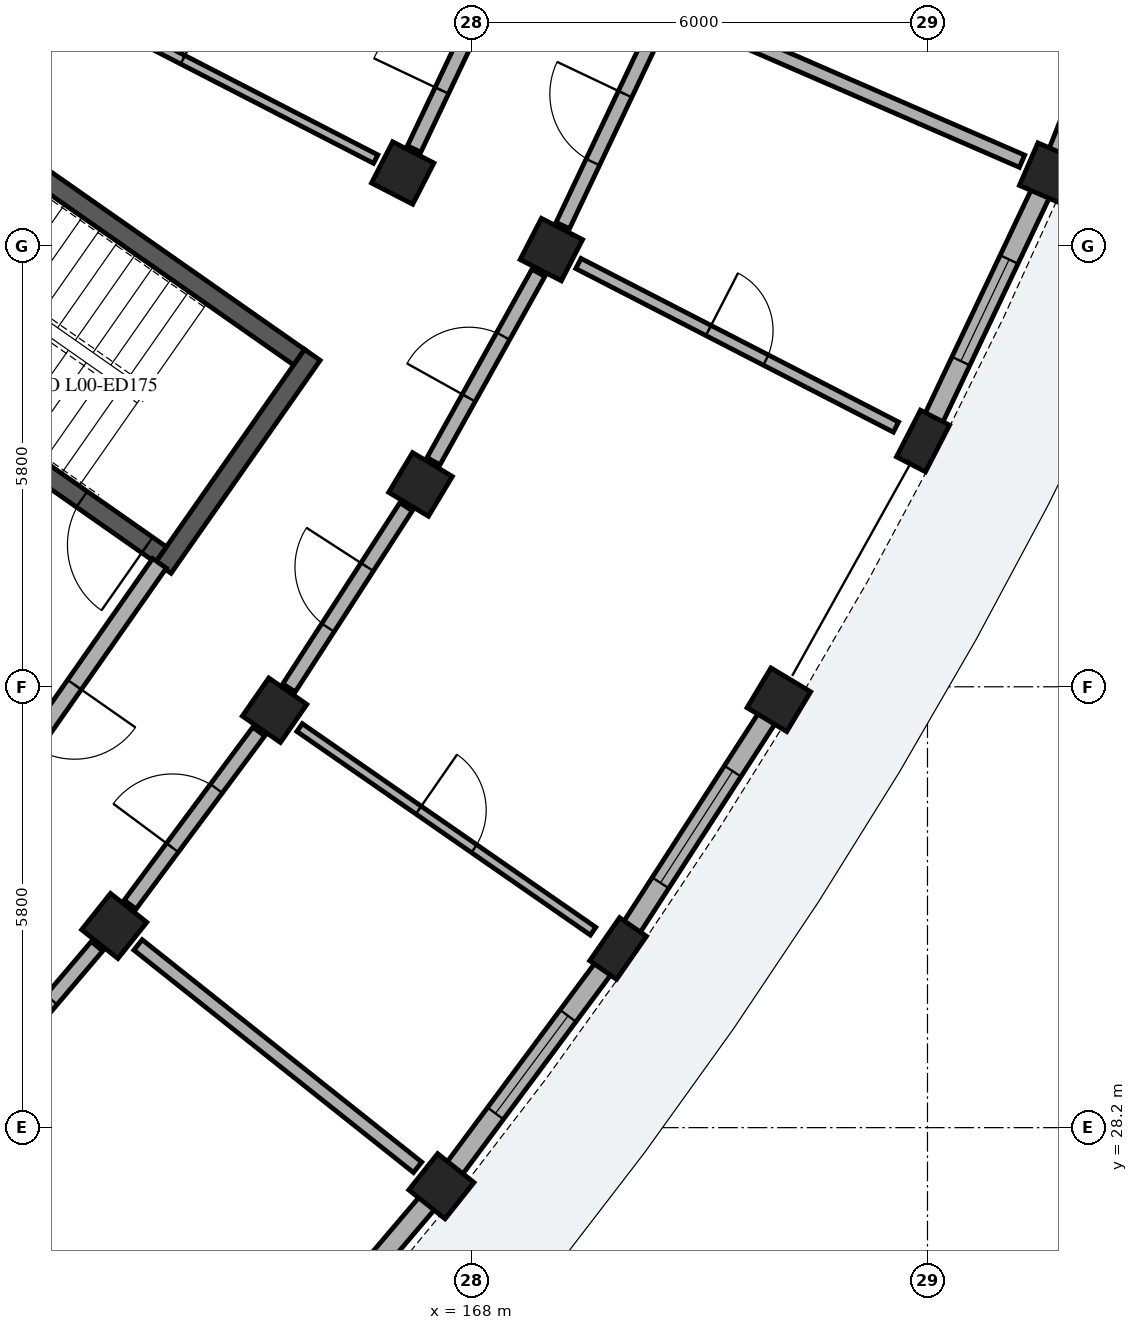
"""IFC4 building model, lengths in metres.
Left out: names, types, materials, properties, quantities, classifications, styles, units other than length and angle.
Written with IfcOpenShell. Run it as: python <this file> out.ifc"""

import sys

from ifc_helpers import new_model, si_unit, direction, frame, frame_2d, origin, origin_2d, place, context, subcontext, project, spatial, rectangle, extrude, element, fill, save


model = new_model("IFC4")
c1 = context("Model", 3, precision=1e-05, world=origin(), true_north=direction((0.0, 1.0)))
c2 = subcontext(c1, "Body", "Model", "MODEL_VIEW")
j1 = project(units=[si_unit("LENGTHUNIT", "METRE"), si_unit("PLANEANGLEUNIT", "RADIAN")], contexts=[c1])
p1 = place(None, origin())
s1 = spatial("IfcSite", under=j1, at=p1, CompositionType="ELEMENT")
p2 = place(p1, origin())
s2 = spatial("IfcBuilding", under=s1, at=p2, CompositionType="ELEMENT")
p3 = place(p2, origin())
s3 = spatial("IfcBuildingStorey", under=s2, at=p3, CompositionType="ELEMENT", Elevation=0.0)
p4 = place(p3, frame((165.733, 38.336, 0.0), z_axis=(0.0, 0.0, 1.0), x_axis=(-0.819153711596, 0.573574055182, 0.0)))
e1 = element("IfcWall", 1, at=p4, inside=s3, PredefinedType="SHEAR", context=c2, shape_type="SweptSolid", body=[
    extrude(rectangle(XDim=6.6, YDim=0.25, at=frame_2d((3.3, 0.0))), origin(), (0.0, 0.0, 1.0), 4.48),
])
p5 = place(p3, frame((165.907, 38.366, 0.0), z_axis=(0.0, 0.0, 1.0), x_axis=(-0.573582112484, -0.819148069789, 0.0)))
e2 = element("IfcWall", 2, at=p5, inside=s3, PredefinedType="SHEAR", context=c2, shape_type="SweptSolid", body=[
    extrude(rectangle(XDim=3.42, YDim=0.25, at=frame_2d((1.71, 0.0))), origin(), (0.0, 0.0, 1.0), 4.48),
])
p6 = place(p3, frame((163.914, 35.739, 0.0), z_axis=(0.0, 0.0, 1.0), x_axis=(-0.819153711596, 0.573574055182, 0.0)))
e3 = element("IfcWall", 3, at=p6, inside=s3, PredefinedType="SHEAR", context=c2, shape_type="SweptSolid", body=[
    extrude(rectangle(XDim=6.6, YDim=0.25, at=frame_2d((3.3, 0.0))), origin(), (0.0, 0.0, 1.0), 4.48),
])
p7 = place(p6, frame((0.22, 0.0, 0.0)))
e4 = element("IfcOpeningElement", 4, at=p7, cuts=e3, PredefinedType="OPENING", context=c2, shape_type="SweptSolid", body=[
    extrude(rectangle(XDim=1.05, YDim=2.15, at=frame_2d((0.525, 1.075))), frame((0.0, 0.135, 0.0), z_axis=(0.0, -1.0, 0.0), x_axis=(1.0, 0.0, 0.0)), (0.0, 0.0, 1.0), 0.27),
])
for number, where, z_axis, x_axis in (
    (5, (163.3, 30.853, 0.0), (0.0, 0.0, 1.0), (0.783, -0.623, 0.0)),
    (6, (167.604, 27.429, 0.0), (0.0, 0.0, 1.0), (0.783, -0.623, 0.0)),
    (7, (165.41, 33.692, 0.0), (0.0, 0.0, 1.0), (0.822, -0.57, 0.0)),
):
    element("IfcColumn", number, at=place(p3, frame(where, z_axis=z_axis, x_axis=x_axis)), inside=s3, PredefinedType="COLUMN", context=c2, shape_type="SweptSolid", body=[
        extrude(rectangle(XDim=0.61, YDim=0.61, at=origin_2d()), origin(), (0.0, 0.0, 1.0), 4.485),
    ])
p8 = place(p3, frame((169.929, 30.557, 0.0), z_axis=(0.0, 0.0, 1.0), x_axis=(0.821646937942, -0.569996762596, 0.0)))
e8 = element("IfcColumn", 8, at=p8, inside=s3, PredefinedType="PILASTER", context=c2, shape_type="SweptSolid", body=[
    extrude(rectangle(XDim=0.43, YDim=0.69, at=origin_2d()), origin(), (0.0, 0.0, 1.0), 4.485),
])
for number, where, z_axis, x_axis in (
    (9, (167.33, 36.662, 0.0), (0.0, 0.0, 1.0), (0.857, -0.515, 0.0)),
    (10, (172.044, 33.83, 0.0), (0.0, 0.0, 1.0), (0.857, -0.515, 0.0)),
    (11, (167.095, 40.759, 0.0), (0.0, 0.0, 1.0), (0.889, -0.458, 0.0)),
    (12, (169.051, 39.752, 0.0), (0.0, 0.0, 1.0), (0.889, -0.458, 0.0)),
):
    element("IfcColumn", number, at=place(p3, frame(where, z_axis=z_axis, x_axis=x_axis)), inside=s3, PredefinedType="COLUMN", context=c2, shape_type="SweptSolid", body=[
        extrude(rectangle(XDim=0.61, YDim=0.61, at=origin_2d()), origin(), (0.0, 0.0, 1.0), 4.485),
    ])
p9 = place(p3, frame((173.941, 37.234, 0.0), z_axis=(0.0, 0.0, 1.0), x_axis=(0.889017141486, -0.457873915117, 0.0)))
e13 = element("IfcColumn", 13, at=p9, inside=s3, PredefinedType="PILASTER", context=c2, shape_type="SweptSolid", body=[
    extrude(rectangle(XDim=0.43, YDim=0.69, at=origin_2d()), origin(), (0.0, 0.0, 1.0), 4.485),
])
p10 = place(p3, frame((175.611, 40.754, 0.0), z_axis=(0.0, 0.0, 1.0), x_axis=(0.917060074385, -0.398749068925, 0.0)))
e14 = element("IfcColumn", 14, at=p10, inside=s3, PredefinedType="COLUMN", context=c2, shape_type="SweptSolid", body=[
    extrude(rectangle(XDim=0.61, YDim=0.61, at=origin_2d()), origin(), (0.0, 0.0, 1.0), 4.485),
])
p11 = place(p3, frame((165.2, 24.602, 0.0), z_axis=(0.0, 0.0, 1.0), x_axis=(0.6477968765, 0.7618131049, 0.0)))
e15 = element("IfcWall", 15, at=p11, inside=s3, PredefinedType="SOLIDWALL", context=c2, shape_type="SweptSolid", body=[
    extrude(rectangle(XDim=3.437, YDim=0.26, at=frame_2d((1.718, 0.0))), origin(), (0.0, 0.0, 1.0), 3.755),
])
p12 = place(p11, frame((0.993, 0.0, 0.55)))
e16 = element("IfcOpeningElement", 16, at=p12, cuts=e15, PredefinedType="OPENING", context=c2, shape_type="SweptSolid", body=[
    extrude(rectangle(XDim=1.45, YDim=1.7, at=frame_2d((0.725, 0.85))), frame((0.0, 0.14, 0.0), z_axis=(0.0, -1.0, 0.0), x_axis=(1.0, 0.0, 0.0)), (0.0, 0.0, 1.0), 0.28),
])
p13 = place(p3, frame((167.768, 27.65, 0.0), z_axis=(0.0, 0.0, 1.0), x_axis=(0.596562008048, 0.802566988203, 0.0)))
e17 = element("IfcWall", 17, at=p13, inside=s3, PredefinedType="SOLIDWALL", context=c2, shape_type="SweptSolid", body=[
    extrude(rectangle(XDim=3.437, YDim=0.26, at=frame_2d((1.718, 0.0))), origin(), (0.0, 0.0, 1.0), 3.755),
])
p14 = place(p13, frame((0.918, 0.0, 0.55)))
e18 = element("IfcOpeningElement", 18, at=p14, cuts=e17, PredefinedType="OPENING", context=c2, shape_type="SweptSolid", body=[
    extrude(rectangle(XDim=1.6, YDim=1.75, at=frame_2d((0.8, 0.875))), frame((0.0, 0.14, 0.0), z_axis=(0.0, -1.0, 0.0), x_axis=(1.0, 0.0, 0.0)), (0.0, 0.0, 1.0), 0.28),
])
p15 = place(p3, frame((170.03, 30.712, 0.0), z_axis=(0.0, 0.0, 1.0), x_axis=(0.54279171039, 0.839867346152, 0.0)))
e19 = element("IfcWall", 19, at=p15, inside=s3, PredefinedType="SOLIDWALL", context=c2, shape_type="SweptSolid", body=[
    extrude(rectangle(XDim=3.437, YDim=0.26, at=frame_2d((1.718, 0.0))), origin(), (0.0, 0.0, 1.0), 3.755),
])
p16 = place(p15, frame((0.844, 0.0, 0.55)))
e20 = element("IfcOpeningElement", 20, at=p16, cuts=e19, PredefinedType="OPENING", context=c2, shape_type="SweptSolid", body=[
    extrude(rectangle(XDim=1.75, YDim=1.85, at=frame_2d((0.875, 0.925))), frame((0.0, 0.14, 0.0), z_axis=(0.0, -1.0, 0.0), x_axis=(1.0, 0.0, 0.0)), (0.0, 0.0, 1.0), 0.28),
])
p17 = place(p3, frame((174.02, 37.401, 0.0), z_axis=(0.0, 0.0, 1.0), x_axis=(0.428562647062, 0.903512068289, 0.0)))
e21 = element("IfcWall", 21, at=p17, inside=s3, PredefinedType="SOLIDWALL", context=c2, shape_type="SweptSolid", body=[
    extrude(rectangle(XDim=3.437, YDim=0.26, at=frame_2d((1.718, 0.0))), origin(), (0.0, 0.0, 1.0), 3.755),
])
p18 = place(p17, frame((0.979, 0.0, 0.55)))
e22 = element("IfcOpeningElement", 22, at=p18, cuts=e21, PredefinedType="OPENING", context=c2, shape_type="SweptSolid", body=[
    extrude(rectangle(XDim=1.48, YDim=1.62, at=frame_2d((0.74, 0.81))), frame((0.0, 0.14, 0.0), z_axis=(0.0, -1.0, 0.0), x_axis=(1.0, 0.0, 0.0)), (0.0, 0.0, 1.0), 0.28),
])
p19 = place(p3, frame((175.712, 41.01, 0.0), z_axis=(0.0, 0.0, 1.0), x_axis=(0.368547399693, 0.929608957669, 0.0)))
e23 = element("IfcWall", 23, at=p19, inside=s3, PredefinedType="SOLIDWALL", context=c2, shape_type="SweptSolid", body=[
    extrude(rectangle(XDim=3.437, YDim=0.26, at=frame_2d((1.718, 0.0))), origin(), (0.0, 0.0, 1.0), 3.755),
])
p20 = place(p19, frame((1.118, 0.0, 0.55)))
e24 = element("IfcOpeningElement", 24, at=p20, cuts=e23, PredefinedType="OPENING", context=c2, shape_type="SweptSolid", body=[
    extrude(rectangle(XDim=1.2, YDim=1.51, at=frame_2d((0.6, 0.755))), frame((0.0, 0.14, 0.0), z_axis=(0.0, -1.0, 0.0), x_axis=(1.0, 0.0, 0.0)), (0.0, 0.0, 1.0), 0.28),
])
p21 = place(p3, frame((163.895, 35.624, 0.0), z_axis=(0.0, 0.0, 1.0), x_axis=(-0.573572687386, -0.819154669329, 0.0)))
e25 = element("IfcWall", 25, at=p21, inside=s3, PredefinedType="PARTITIONING", context=c2, shape_type="SweptSolid", body=[
    extrude(rectangle(XDim=4.9, YDim=0.22, at=frame_2d((2.45, 0.0))), origin(), (0.0, 0.0, 1.0), 3.74),
])
p22 = place(p21, frame((1.95, 0.0, 0.0)))
e26 = element("IfcOpeningElement", 26, at=p22, cuts=e25, PredefinedType="OPENING", context=c2, shape_type="SweptSolid", body=[
    extrude(rectangle(XDim=0.98, YDim=2.14, at=frame_2d((0.49, 1.07))), frame((0.0, 0.12, 0.0), z_axis=(0.0, -1.0, 0.0), x_axis=(1.0, 0.0, 0.0)), (0.0, 0.0, 1.0), 0.24),
])
p23 = place(p3, frame((161.236, 28.425, 0.0), z_axis=(0.0, 0.0, 1.0), x_axis=(0.64778830669, 0.761820392032, 0.0)))
e27 = element("IfcWall", 27, at=p23, inside=s3, PredefinedType="PARTITIONING", context=c2, shape_type="SweptSolid", body=[
    extrude(rectangle(XDim=2.837, YDim=0.195, at=frame_2d((1.418, 0.0))), origin(), (0.0, 0.0, 1.0), 3.1),
])
p24 = place(p23, frame((0.924, 0.0, 0.0)))
e28 = element("IfcOpeningElement", 28, at=p24, cuts=e27, PredefinedType="OPENING", context=c2, shape_type="SweptSolid", body=[
    extrude(rectangle(XDim=0.99, YDim=2.16, at=frame_2d((0.495, 1.08))), frame((0.0, 0.107, 0.0), z_axis=(0.0, -1.0, 0.0), x_axis=(1.0, 0.0, 0.0)), (0.0, 0.0, 1.0), 0.215),
])
p25 = place(p3, frame((163.613, 30.604, 0.0), z_axis=(0.0, 0.0, 1.0), x_axis=(0.782609106384, -0.622513442911, 0.0)))
e29 = element("IfcWall", 29, at=p25, inside=s3, PredefinedType="PARTITIONING", context=c2, shape_type="SweptSolid", body=[
    extrude(rectangle(XDim=4.7, YDim=0.175, at=frame_2d((2.35, 0.0))), origin(), (0.0, 0.0, 1.0), 3.1),
])
p26 = place(p3, frame((163.509, 31.134, 0.0), z_axis=(0.0, 0.0, 1.0), x_axis=(0.596552136601, 0.802574325727, 0.0)))
e30 = element("IfcWall", 30, at=p26, inside=s3, PredefinedType="PARTITIONING", context=c2, shape_type="SweptSolid", body=[
    extrude(rectangle(XDim=2.837, YDim=0.195, at=frame_2d((1.418, 0.0))), origin(), (0.0, 0.0, 1.0), 3.1),
])
p27 = place(p26, frame((0.934, 0.0, 0.0)))
e31 = element("IfcOpeningElement", 31, at=p27, cuts=e30, PredefinedType="OPENING", context=c2, shape_type="SweptSolid", body=[
    extrude(rectangle(XDim=0.97, YDim=2.15, at=frame_2d((0.485, 1.075))), frame((0.0, 0.107, 0.0), z_axis=(0.0, -1.0, 0.0), x_axis=(1.0, 0.0, 0.0)), (0.0, 0.0, 1.0), 0.215),
])
p28 = place(p3, frame((165.739, 33.464, 0.0), z_axis=(0.0, 0.0, 1.0), x_axis=(0.821638260647, -0.570009270663, 0.0)))
e32 = element("IfcWall", 32, at=p28, inside=s3, PredefinedType="PARTITIONING", context=c2, shape_type="SweptSolid", body=[
    extrude(rectangle(XDim=4.7, YDim=0.125, at=frame_2d((2.35, 0.0))), origin(), (0.0, 0.0, 1.0), 3.1),
])
p29 = place(p28, frame((1.905, 0.0, 0.0)))
e33 = element("IfcOpeningElement", 33, at=p29, cuts=e32, PredefinedType="OPENING", context=c2, shape_type="SweptSolid", body=[
    extrude(rectangle(XDim=0.89, YDim=2.1, at=frame_2d((0.445, 1.05))), frame((0.0, 0.073, 0.0), z_axis=(0.0, -1.0, 0.0), x_axis=(1.0, 0.0, 0.0)), (0.0, 0.0, 1.0), 0.145),
])
p30 = place(p3, frame((165.6, 33.986, 0.0), z_axis=(0.0, 0.0, 1.0), x_axis=(0.542787304957, 0.83987019329, 0.0)))
e34 = element("IfcWall", 34, at=p30, inside=s3, PredefinedType="PARTITIONING", context=c2, shape_type="SweptSolid", body=[
    extrude(rectangle(XDim=2.837, YDim=0.195, at=frame_2d((1.418, 0.0))), origin(), (0.0, 0.0, 1.0), 3.1),
])
p31 = place(p30, frame((0.944, 0.0, 0.0)))
e35 = element("IfcOpeningElement", 35, at=p31, cuts=e34, PredefinedType="OPENING", context=c2, shape_type="SweptSolid", body=[
    extrude(rectangle(XDim=0.95, YDim=2.13, at=frame_2d((0.475, 1.065))), frame((0.0, 0.107, 0.0), z_axis=(0.0, -1.0, 0.0), x_axis=(1.0, 0.0, 0.0)), (0.0, 0.0, 1.0), 0.215),
])
p32 = place(p3, frame((167.5, 36.968, 0.0), z_axis=(0.0, 0.0, 1.0), x_axis=(0.48673124079, 0.8735517725, 0.0)))
e36 = element("IfcWall", 36, at=p32, inside=s3, PredefinedType="PARTITIONING", context=c2, shape_type="SweptSolid", body=[
    extrude(rectangle(XDim=2.837, YDim=0.195, at=frame_2d((1.418, 0.0))), origin(), (0.0, 0.0, 1.0), 3.1),
])
p33 = place(p32, frame((0.954, 0.0, 0.0)))
e37 = element("IfcOpeningElement", 37, at=p33, cuts=e36, PredefinedType="OPENING", context=c2, shape_type="SweptSolid", body=[
    extrude(rectangle(XDim=0.93, YDim=2.12, at=frame_2d((0.465, 1.06))), frame((0.0, 0.107, 0.0), z_axis=(0.0, -1.0, 0.0), x_axis=(1.0, 0.0, 0.0)), (0.0, 0.0, 1.0), 0.215),
])
p34 = place(p3, frame((169.407, 39.569, 0.0), z_axis=(0.0, 0.0, 1.0), x_axis=(0.889013002038, -0.457881952262, 0.0)))
e38 = element("IfcWall", 38, at=p34, inside=s3, PredefinedType="PLUMBINGWALL", context=c2, shape_type="SweptSolid", body=[
    extrude(rectangle(XDim=4.7, YDim=0.15, at=frame_2d((2.35, 0.0))), origin(), (0.0, 0.0, 1.0), 3.1),
])
p35 = place(p34, frame((1.925, 0.0, 0.0)))
e39 = element("IfcOpeningElement", 39, at=p35, cuts=e38, PredefinedType="OPENING", context=c2, shape_type="SweptSolid", body=[
    extrude(rectangle(XDim=0.85, YDim=2.05, at=frame_2d((0.425, 1.025))), frame((0.0, 0.085, 0.0), z_axis=(0.0, -1.0, 0.0), x_axis=(1.0, 0.0, 0.0)), (0.0, 0.0, 1.0), 0.17),
])
p36 = place(p3, frame((160.872, 43.964, 0.0), z_axis=(0.0, 0.0, 1.0), x_axis=(0.889022010753, -0.457864460727, 0.0)))
e40 = element("IfcWall", 40, at=p36, inside=s3, PredefinedType="PARTITIONING", context=c2, shape_type="SweptSolid", body=[
    extrude(rectangle(XDim=6.6, YDim=0.125, at=frame_2d((3.3, 0.0))), origin(), (0.0, 0.0, 1.0), 3.1),
])
p37 = place(p36, frame((2.855, 0.0, 0.0)))
e41 = element("IfcOpeningElement", 41, at=p37, cuts=e40, PredefinedType="OPENING", context=c2, shape_type="SweptSolid", body=[
    extrude(rectangle(XDim=0.89, YDim=2.1, at=frame_2d((0.445, 1.05))), frame((0.0, 0.073, 0.0), z_axis=(0.0, -1.0, 0.0), x_axis=(1.0, 0.0, 0.0)), (0.0, 0.0, 1.0), 0.145),
])
p38 = place(p3, frame((169.201, 40.068, 0.0), z_axis=(0.0, 0.0, 1.0), x_axis=(0.428493237107, 0.903544988229, 0.0)))
e42 = element("IfcWall", 42, at=p38, inside=s3, PredefinedType="PARTITIONING", context=c2, shape_type="SweptSolid", body=[
    extrude(rectangle(XDim=2.837, YDim=0.195, at=frame_2d((1.418, 0.0))), origin(), (0.0, 0.0, 1.0), 3.1),
])
p39 = place(p38, frame((0.924, 0.0, 0.0)))
e43 = element("IfcOpeningElement", 43, at=p39, cuts=e42, PredefinedType="OPENING", context=c2, shape_type="SweptSolid", body=[
    extrude(rectangle(XDim=0.99, YDim=2.16, at=frame_2d((0.495, 1.08))), frame((0.0, 0.107, 0.0), z_axis=(0.0, -1.0, 0.0), x_axis=(1.0, 0.0, 0.0)), (0.0, 0.0, 1.0), 0.215),
])
p40 = place(p3, frame((167.246, 41.075, 0.0), z_axis=(0.0, 0.0, 1.0), x_axis=(0.428550049392, 0.903518043631, 0.0)))
e44 = element("IfcWall", 44, at=p40, inside=s3, PredefinedType="PARTITIONING", context=c2, shape_type="SweptSolid", body=[
    extrude(rectangle(XDim=2.693, YDim=0.195, at=frame_2d((1.346, 0.0))), origin(), (0.0, 0.0, 1.0), 3.1),
])
p41 = place(p40, frame((0.852, 0.0, 0.0)))
e45 = element("IfcOpeningElement", 45, at=p41, cuts=e44, PredefinedType="OPENING", context=c2, shape_type="SweptSolid", body=[
    extrude(rectangle(XDim=0.99, YDim=2.16, at=frame_2d((0.495, 1.08))), frame((0.0, 0.107, 0.0), z_axis=(0.0, -1.0, 0.0), x_axis=(1.0, 0.0, 0.0)), (0.0, 0.0, 1.0), 0.215),
])
p42 = place(p3, frame((170.934, 42.788, 0.0), z_axis=(0.0, 0.0, 1.0), x_axis=(0.917071707884, -0.398722312643, 0.0)))
e46 = element("IfcWall", 46, at=p42, inside=s3, PredefinedType="PARTITIONING", context=c2, shape_type="SweptSolid", body=[
    extrude(rectangle(XDim=4.7, YDim=0.175, at=frame_2d((2.35, 0.0))), origin(), (0.0, 0.0, 1.0), 3.1),
])
p43 = place(p14, origin())
e47 = element("IfcWindow", 47, at=p43, inside=s3, PartitioningType="SINGLE_PANEL", PredefinedType="WINDOW", context=c2, shape_type="SweptSolid", body=[
    extrude(rectangle(XDim=1.6, YDim=1.75, at=frame_2d((0.8, 0.875))), frame((0.0, 0.03, 0.0), z_axis=(0.0, -1.0, 0.0), x_axis=(1.0, 0.0, 0.0)), (0.0, 0.0, 1.0), 0.06),
])
fill(e18, e47)
p44 = place(p16, origin())
e48 = element("IfcWindow", 48, at=p44, inside=s3, PartitioningType="SINGLE_PANEL", PredefinedType="WINDOW", context=c2, shape_type="SweptSolid", body=[
    extrude(rectangle(XDim=1.75, YDim=1.85, at=frame_2d((0.875, 0.925))), frame((0.0, 0.03, 0.0), z_axis=(0.0, -1.0, 0.0), x_axis=(1.0, 0.0, 0.0)), (0.0, 0.0, 1.0), 0.06),
])
fill(e20, e48)
p45 = place(p18, origin())
e49 = element("IfcWindow", 49, at=p45, inside=s3, PartitioningType="SINGLE_PANEL", PredefinedType="WINDOW", context=c2, shape_type="SweptSolid", body=[
    extrude(rectangle(XDim=1.48, YDim=1.62, at=frame_2d((0.74, 0.81))), frame((0.0, 0.03, 0.0), z_axis=(0.0, -1.0, 0.0), x_axis=(1.0, 0.0, 0.0)), (0.0, 0.0, 1.0), 0.06),
])
fill(e22, e49)
p46 = place(p7, origin())
e50 = element("IfcDoor", 50, at=p46, inside=s3, OperationType="SINGLE_SWING_LEFT", PredefinedType="DOOR", context=c2, shape_type="SweptSolid", body=[
    extrude(rectangle(XDim=1.05, YDim=2.15, at=frame_2d((0.525, 1.075))), frame((0.0, 0.025, 0.0), z_axis=(0.0, -1.0, 0.0), x_axis=(1.0, 0.0, 0.0)), (0.0, 0.0, 1.0), 0.05),
])
fill(e4, e50)
p47 = place(p22, origin())
e51 = element("IfcDoor", 51, at=p47, inside=s3, OperationType="SINGLE_SWING_LEFT", PredefinedType="DOOR", context=c2, shape_type="SweptSolid", body=[
    extrude(rectangle(XDim=0.98, YDim=2.14, at=frame_2d((0.49, 1.07))), frame((0.0, 0.025, 0.0), z_axis=(0.0, -1.0, 0.0), x_axis=(1.0, 0.0, 0.0)), (0.0, 0.0, 1.0), 0.05),
])
fill(e26, e51)
p48 = place(p24, origin())
e52 = element("IfcDoor", 52, at=p48, inside=s3, OperationType="SINGLE_SWING_RIGHT", PredefinedType="DOOR", context=c2, shape_type="SweptSolid", body=[
    extrude(rectangle(XDim=0.99, YDim=2.16, at=frame_2d((0.495, 1.08))), frame((0.0, 0.025, 0.0), z_axis=(0.0, -1.0, 0.0), x_axis=(1.0, 0.0, 0.0)), (0.0, 0.0, 1.0), 0.05),
])
fill(e28, e52)
p49 = place(p27, origin())
e53 = element("IfcDoor", 53, at=p49, inside=s3, OperationType="SINGLE_SWING_LEFT", PredefinedType="DOOR", context=c2, shape_type="SweptSolid", body=[
    extrude(rectangle(XDim=0.97, YDim=2.15, at=frame_2d((0.485, 1.075))), frame((0.0, 0.025, 0.0), z_axis=(0.0, -1.0, 0.0), x_axis=(1.0, 0.0, 0.0)), (0.0, 0.0, 1.0), 0.05),
])
fill(e31, e53)
p50 = place(p29, origin())
e54 = element("IfcDoor", 54, at=p50, inside=s3, OperationType="SINGLE_SWING_LEFT", PredefinedType="DOOR", context=c2, shape_type="SweptSolid", body=[
    extrude(rectangle(XDim=0.89, YDim=2.1, at=frame_2d((0.445, 1.05))), frame((0.0, 0.025, 0.0), z_axis=(0.0, -1.0, 0.0), x_axis=(1.0, 0.0, 0.0)), (0.0, 0.0, 1.0), 0.05),
])
fill(e33, e54)
p51 = place(p31, origin())
e55 = element("IfcDoor", 55, at=p51, inside=s3, OperationType="SINGLE_SWING_RIGHT", PredefinedType="DOOR", context=c2, shape_type="SweptSolid", body=[
    extrude(rectangle(XDim=0.95, YDim=2.13, at=frame_2d((0.475, 1.065))), frame((0.0, 0.025, 0.0), z_axis=(0.0, -1.0, 0.0), x_axis=(1.0, 0.0, 0.0)), (0.0, 0.0, 1.0), 0.05),
])
fill(e35, e55)
p52 = place(p33, origin())
e56 = element("IfcDoor", 56, at=p52, inside=s3, OperationType="SINGLE_SWING_LEFT", PredefinedType="DOOR", context=c2, shape_type="SweptSolid", body=[
    extrude(rectangle(XDim=0.93, YDim=2.12, at=frame_2d((0.465, 1.06))), frame((0.0, 0.025, 0.0), z_axis=(0.0, -1.0, 0.0), x_axis=(1.0, 0.0, 0.0)), (0.0, 0.0, 1.0), 0.05),
])
fill(e37, e56)
p53 = place(p35, origin())
e57 = element("IfcDoor", 57, at=p53, inside=s3, OperationType="SINGLE_SWING_LEFT", PredefinedType="DOOR", context=c2, shape_type="SweptSolid", body=[
    extrude(rectangle(XDim=0.85, YDim=2.05, at=frame_2d((0.425, 1.025))), frame((0.0, 0.025, 0.0), z_axis=(0.0, -1.0, 0.0), x_axis=(1.0, 0.0, 0.0)), (0.0, 0.0, 1.0), 0.05),
])
fill(e39, e57)
p54 = place(p37, origin())
e58 = element("IfcDoor", 58, at=p54, inside=s3, OperationType="SINGLE_SWING_RIGHT", PredefinedType="DOOR", context=c2, shape_type="SweptSolid", body=[
    extrude(rectangle(XDim=0.89, YDim=2.1, at=frame_2d((0.445, 1.05))), frame((0.0, 0.025, 0.0), z_axis=(0.0, -1.0, 0.0), x_axis=(1.0, 0.0, 0.0)), (0.0, 0.0, 1.0), 0.05),
])
fill(e41, e58)
p55 = place(p39, origin())
e59 = element("IfcDoor", 59, at=p55, inside=s3, OperationType="SINGLE_SWING_RIGHT", PredefinedType="DOOR", context=c2, shape_type="SweptSolid", body=[
    extrude(rectangle(XDim=0.99, YDim=2.16, at=frame_2d((0.495, 1.08))), frame((0.0, 0.025, 0.0), z_axis=(0.0, -1.0, 0.0), x_axis=(1.0, 0.0, 0.0)), (0.0, 0.0, 1.0), 0.05),
])
fill(e43, e59)
p56 = place(p41, origin())
e60 = element("IfcDoor", 60, at=p56, inside=s3, OperationType="SINGLE_SWING_LEFT", PredefinedType="DOOR", context=c2, shape_type="SweptSolid", body=[
    extrude(rectangle(XDim=0.99, YDim=2.16, at=frame_2d((0.495, 1.08))), frame((0.0, 0.025, 0.0), z_axis=(0.0, -1.0, 0.0), x_axis=(1.0, 0.0, 0.0)), (0.0, 0.0, 1.0), 0.05),
])
fill(e45, e60)
save(model, sys.argv[1])
